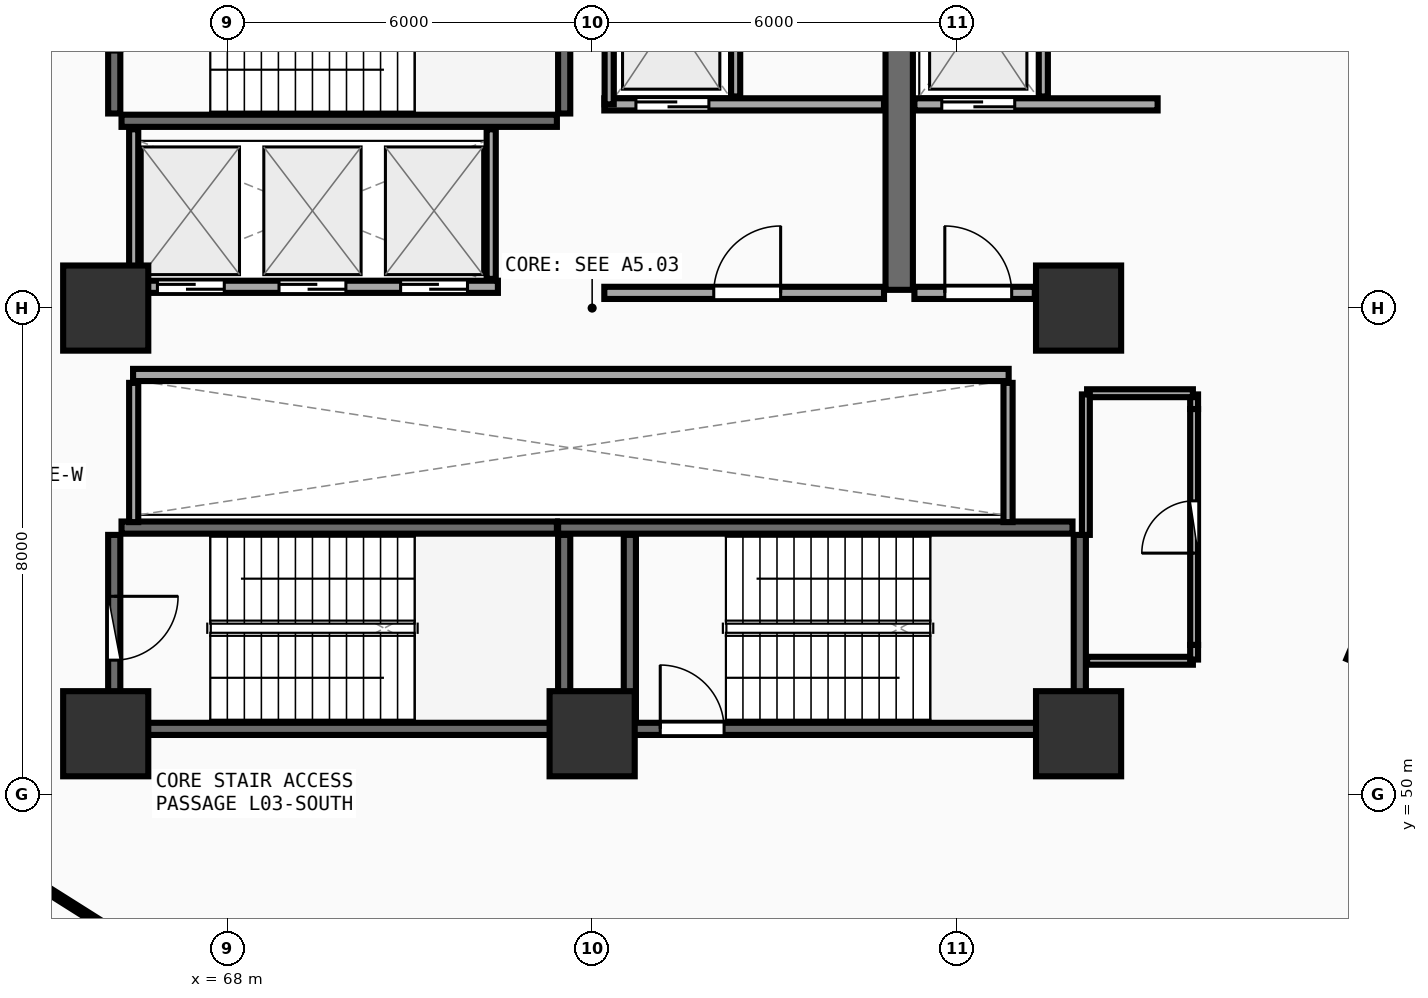
"""IFC4 building model, lengths in metres.
Left out: names, types, materials, properties, quantities, classifications, styles, units other than length and angle.
Written with IfcOpenShell. Run it as: python <this file> out.ifc"""

import sys

from ifc_helpers import new_model, si_unit, direction, frame, frame_2d, origin, origin_2d, place, context, subcontext, project, spatial, rectangle, extrude, element, fill, save


model = new_model("IFC4")
c1 = context("Model", 3, precision=1e-05, world=origin(), true_north=direction((0.0, 1.0)))
c2 = subcontext(c1, "Body", "Model", "MODEL_VIEW")
j1 = project(units=[si_unit("LENGTHUNIT", "METRE"), si_unit("PLANEANGLEUNIT", "RADIAN")], contexts=[c1])
p1 = place(None, origin())
s1 = spatial("IfcSite", under=j1, at=p1, CompositionType="ELEMENT")
p2 = place(p1, origin())
s2 = spatial("IfcBuilding", under=s1, at=p2, CompositionType="ELEMENT")
p3 = place(p2, frame((0.0, 0.0, 13.5)))
s3 = spatial("IfcBuildingStorey", under=s2, at=p3, CompositionType="ELEMENT", Elevation=13.5)
for number, where, z_axis, x_axis in (
    (1, (66.0, 51.0, 0.0), (0.0, 0.0, 1.0), (1.0, 0.0, 0.0)),
    (2, (74.0, 51.0, 0.0), (0.0, 0.0, 1.0), (1.0, 0.0, 0.0)),
    (3, (82.0, 51.0, 0.0), (0.0, 0.0, 1.0), (1.0, 0.0, 0.0)),
    (4, (82.0, 58.0, 0.0), (0.0, 0.0, 1.0), (1.0, 0.0, 0.0)),
    (5, (66.0, 58.0, 0.0), (0.0, 0.0, 1.0), (1.0, 0.0, 0.0)),
):
    element("IfcColumn", number, at=place(p3, frame(where, z_axis=z_axis, x_axis=x_axis)), inside=s3, PredefinedType="PILASTER", context=c2, shape_type="SweptSolid", body=[
        extrude(rectangle(XDim=1.4, YDim=1.4, at=origin_2d()), origin(), (0.0, 0.0, 1.0), 4.5),
    ])
p4 = place(p3, frame((66.26, 61.08, 0.0), z_axis=(0.0, 0.0, 1.0), x_axis=(1.0, 0.0, 0.0)))
e6 = element("IfcWall", 6, at=p4, inside=s3, PredefinedType="SHEAR", context=c2, shape_type="SweptSolid", body=[
    extrude(rectangle(XDim=7.16, YDim=0.2, at=frame_2d((3.58, 0.0))), origin(), (0.0, 0.0, 1.0), 4.1),
])
p5 = place(p3, frame((73.54, 61.2, 0.0), z_axis=(0.0, 0.0, 1.0), x_axis=(0.0, 1.0, 0.0)))
e7 = element("IfcWall", 7, at=p5, inside=s3, PredefinedType="SHEAR", context=c2, shape_type="SweptSolid", body=[
    extrude(rectangle(XDim=3.07, YDim=0.2, at=frame_2d((1.535, 0.0))), origin(), (0.0, 0.0, 1.0), 4.1),
])
p6 = place(p3, frame((66.14, 64.27, 0.0), z_axis=(0.0, 0.0, 1.0), x_axis=(0.0, -1.0, 0.0)))
e8 = element("IfcWall", 8, at=p6, inside=s3, PredefinedType="SHEAR", context=c2, shape_type="SweptSolid", body=[
    extrude(rectangle(XDim=3.07, YDim=0.2, at=frame_2d((1.535, 0.0))), origin(), (0.0, 0.0, 1.0), 4.1),
])
p7 = place(p6, frame((1.01, 0.0, 0.0)))
e9 = element("IfcOpeningElement", 9, at=p7, cuts=e8, PredefinedType="OPENING", context=c2, shape_type="SweptSolid", body=[
    extrude(rectangle(XDim=1.05, YDim=2.1, at=frame_2d((0.525, 1.05))), frame((0.0, 0.11, 0.0), z_axis=(0.0, -1.0, 0.0), x_axis=(1.0, 0.0, 0.0)), (0.0, 0.0, 1.0), 0.22),
])
p8 = place(p3, frame((74.0, 51.08, 0.0), z_axis=(0.0, 0.0, 1.0), x_axis=(1.0, 0.0, 0.0)))
e10 = element("IfcWall", 10, at=p8, inside=s3, PredefinedType="SHEAR", context=c2, shape_type="SweptSolid", body=[
    extrude(rectangle(XDim=7.9, YDim=0.2, at=frame_2d((3.95, 0.0))), origin(), (0.0, 0.0, 1.0), 4.1),
])
p9 = place(p8, frame((1.12, 0.0, 0.0)))
e11 = element("IfcOpeningElement", 11, at=p9, cuts=e10, PredefinedType="OPENING", context=c2, shape_type="SweptSolid", body=[
    extrude(rectangle(XDim=1.05, YDim=2.1, at=frame_2d((0.525, 1.05))), frame((0.0, 0.11, 0.0), z_axis=(0.0, -1.0, 0.0), x_axis=(1.0, 0.0, 0.0)), (0.0, 0.0, 1.0), 0.22),
])
p10 = place(p3, frame((82.02, 51.2, 0.0), z_axis=(0.0, 0.0, 1.0), x_axis=(0.0, 1.0, 0.0)))
e12 = element("IfcWall", 12, at=p10, inside=s3, PredefinedType="SHEAR", context=c2, shape_type="SweptSolid", body=[
    extrude(rectangle(XDim=3.07, YDim=0.2, at=frame_2d((1.535, 0.0))), origin(), (0.0, 0.0, 1.0), 4.1),
])
p11 = place(p3, frame((81.9, 54.39, 0.0), z_axis=(0.0, 0.0, 1.0), x_axis=(-1.0, 0.0, 0.0)))
e13 = element("IfcWall", 13, at=p11, inside=s3, PredefinedType="SHEAR", context=c2, shape_type="SweptSolid", body=[
    extrude(rectangle(XDim=8.46, YDim=0.2, at=frame_2d((4.23, 0.0))), origin(), (0.0, 0.0, 1.0), 4.1),
])
p12 = place(p3, frame((74.62, 54.27, 0.0), z_axis=(0.0, 0.0, 1.0), x_axis=(0.0, -1.0, 0.0)))
e14 = element("IfcWall", 14, at=p12, inside=s3, PredefinedType="SHEAR", context=c2, shape_type="SweptSolid", body=[
    extrude(rectangle(XDim=3.07, YDim=0.2, at=frame_2d((1.535, 0.0))), origin(), (0.0, 0.0, 1.0), 4.1),
])
p13 = place(p3, frame((66.26, 51.08, 0.0), z_axis=(0.0, 0.0, 1.0), x_axis=(1.0, 0.0, 0.0)))
e15 = element("IfcWall", 15, at=p13, inside=s3, PredefinedType="SHEAR", context=c2, shape_type="SweptSolid", body=[
    extrude(rectangle(XDim=7.16, YDim=0.2, at=frame_2d((3.58, 0.0))), origin(), (0.0, 0.0, 1.0), 4.1),
])
p14 = place(p3, frame((73.54, 51.2, 0.0), z_axis=(0.0, 0.0, 1.0), x_axis=(0.0, 1.0, 0.0)))
e16 = element("IfcWall", 16, at=p14, inside=s3, PredefinedType="SHEAR", context=c2, shape_type="SweptSolid", body=[
    extrude(rectangle(XDim=3.07, YDim=0.2, at=frame_2d((1.535, 0.0))), origin(), (0.0, 0.0, 1.0), 4.1),
])
p15 = place(p3, frame((73.42, 54.39, 0.0), z_axis=(0.0, 0.0, 1.0), x_axis=(-1.0, 0.0, 0.0)))
e17 = element("IfcWall", 17, at=p15, inside=s3, PredefinedType="SHEAR", context=c2, shape_type="SweptSolid", body=[
    extrude(rectangle(XDim=7.16, YDim=0.2, at=frame_2d((3.58, 0.0))), origin(), (0.0, 0.0, 1.0), 4.1),
])
p16 = place(p3, frame((66.14, 54.27, 0.0), z_axis=(0.0, 0.0, 1.0), x_axis=(0.0, -1.0, 0.0)))
e18 = element("IfcWall", 18, at=p16, inside=s3, PredefinedType="SHEAR", context=c2, shape_type="SweptSolid", body=[
    extrude(rectangle(XDim=3.07, YDim=0.2, at=frame_2d((1.535, 0.0))), origin(), (0.0, 0.0, 1.0), 4.1),
])
p17 = place(p16, frame((1.01, 0.0, 0.0)))
e19 = element("IfcOpeningElement", 19, at=p17, cuts=e18, PredefinedType="OPENING", context=c2, shape_type="SweptSolid", body=[
    extrude(rectangle(XDim=1.05, YDim=2.1, at=frame_2d((0.525, 1.05))), frame((0.0, 0.11, 0.0), z_axis=(0.0, -1.0, 0.0), x_axis=(1.0, 0.0, 0.0)), (0.0, 0.0, 1.0), 0.22),
])
p18 = place(p3, frame((79.05, 58.3, 0.0), z_axis=(0.0, 0.0, 1.0), x_axis=(0.0, 1.0, 0.0)))
e20 = element("IfcWall", 20, at=p18, inside=s3, PredefinedType="SHEAR", context=c2, shape_type="SweptSolid", body=[
    extrude(rectangle(XDim=6.3, YDim=0.45, at=frame_2d((3.15, 0.0))), origin(), (0.0, 0.0, 1.0), 4.1),
])
p19 = place(p3, frame((74.2, 61.35, 0.0), z_axis=(0.0, 0.0, 1.0), x_axis=(1.0, 0.0, 0.0)))
e21 = element("IfcWall", 21, at=p19, inside=s3, PredefinedType="SOLIDWALL", context=c2, shape_type="SweptSolid", body=[
    extrude(rectangle(XDim=4.6, YDim=0.2, at=frame_2d((2.3, 0.0))), origin(), (0.0, 0.0, 1.0), 4.09),
])
p20 = place(p19, frame((0.52, 0.0, 0.0)))
e22 = element("IfcOpeningElement", 22, at=p20, cuts=e21, PredefinedType="OPENING", context=c2, shape_type="SweptSolid", body=[
    extrude(rectangle(XDim=1.2, YDim=2.15, at=frame_2d((0.6, 1.075))), frame((0.0, 0.11, 0.0), z_axis=(0.0, -1.0, 0.0), x_axis=(1.0, 0.0, 0.0)), (0.0, 0.0, 1.0), 0.22),
])
p21 = place(p3, frame((74.28, 61.35, 0.0), z_axis=(0.0, 0.0, 1.0), x_axis=(0.0, 1.0, 0.0)))
e23 = element("IfcWall", 23, at=p21, inside=s3, PredefinedType="PARTITIONING", context=c2, shape_type="SweptSolid", body=[
    extrude(rectangle(XDim=2.97, YDim=0.15, at=frame_2d((1.485, 0.0))), origin(), (0.0, 0.0, 1.0), 4.09),
])
p22 = place(p3, frame((76.36, 61.48, 0.0), z_axis=(0.0, 0.0, 1.0), x_axis=(0.0, 1.0, 0.0)))
e24 = element("IfcWall", 24, at=p22, inside=s3, PredefinedType="PARTITIONING", context=c2, shape_type="SweptSolid", body=[
    extrude(rectangle(XDim=2.84, YDim=0.15, at=frame_2d((1.42, 0.0))), origin(), (0.0, 0.0, 1.0), 4.09),
])
p23 = place(p3, frame((79.3, 61.35, 0.0), z_axis=(0.0, 0.0, 1.0), x_axis=(1.0, 0.0, 0.0)))
e25 = element("IfcWall", 25, at=p23, inside=s3, PredefinedType="SOLIDWALL", context=c2, shape_type="SweptSolid", body=[
    extrude(rectangle(XDim=4.0, YDim=0.2, at=frame_2d((2.0, 0.0))), origin(), (0.0, 0.0, 1.0), 3.385),
])
p24 = place(p23, frame((0.45, 0.0, 0.0)))
e26 = element("IfcOpeningElement", 26, at=p24, cuts=e25, PredefinedType="OPENING", context=c2, shape_type="SweptSolid", body=[
    extrude(rectangle(XDim=1.2, YDim=2.15, at=frame_2d((0.6, 1.075))), frame((0.0, 0.11, 0.0), z_axis=(0.0, -1.0, 0.0), x_axis=(1.0, 0.0, 0.0)), (0.0, 0.0, 1.0), 0.22),
])
p25 = place(p3, frame((81.42, 61.48, 0.0), z_axis=(0.0, 0.0, 1.0), x_axis=(0.0, 1.0, 0.0)))
e27 = element("IfcWall", 27, at=p25, inside=s3, PredefinedType="PARTITIONING", context=c2, shape_type="SweptSolid", body=[
    extrude(rectangle(XDim=2.84, YDim=0.15, at=frame_2d((1.42, 0.0))), origin(), (0.0, 0.0, 1.0), 4.09),
])
p26 = place(p3, frame((74.2, 58.25, 0.0), z_axis=(0.0, 0.0, 1.0), x_axis=(1.0, 0.0, 0.0)))
e28 = element("IfcWall", 28, at=p26, inside=s3, PredefinedType="SOLIDWALL", context=c2, shape_type="SweptSolid", body=[
    extrude(rectangle(XDim=4.6, YDim=0.2, at=frame_2d((2.3, 0.0))), origin(), (0.0, 0.0, 1.0), 4.09),
])
p27 = place(p26, frame((1.8, 0.0, 0.0)))
e29 = element("IfcOpeningElement", 29, at=p27, cuts=e28, PredefinedType="OPENING", context=c2, shape_type="SweptSolid", body=[
    extrude(rectangle(XDim=1.1, YDim=2.1, at=frame_2d((0.55, 1.05))), frame((0.0, 0.11, 0.0), z_axis=(0.0, -1.0, 0.0), x_axis=(1.0, 0.0, 0.0)), (0.0, 0.0, 1.0), 0.22),
])
p28 = place(p3, frame((79.3, 58.25, 0.0), z_axis=(0.0, 0.0, 1.0), x_axis=(1.0, 0.0, 0.0)))
e30 = element("IfcWall", 30, at=p28, inside=s3, PredefinedType="SOLIDWALL", context=c2, shape_type="SweptSolid", body=[
    extrude(rectangle(XDim=1.98, YDim=0.2, at=frame_2d((0.99, 0.0))), origin(), (0.0, 0.0, 1.0), 4.09),
])
p29 = place(p28, frame((0.5, 0.0, 0.0)))
e31 = element("IfcOpeningElement", 31, at=p29, cuts=e30, PredefinedType="OPENING", context=c2, shape_type="SweptSolid", body=[
    extrude(rectangle(XDim=1.1, YDim=2.1, at=frame_2d((0.55, 1.05))), frame((0.0, 0.11, 0.0), z_axis=(0.0, -1.0, 0.0), x_axis=(1.0, 0.0, 0.0)), (0.0, 0.0, 1.0), 0.22),
])
p30 = place(p3, frame((66.45, 58.35, 0.0), z_axis=(0.0, 0.0, 1.0), x_axis=(1.0, 0.0, 0.0)))
e32 = element("IfcWall", 32, at=p30, inside=s3, PredefinedType="SOLIDWALL", context=c2, shape_type="SweptSolid", body=[
    extrude(rectangle(XDim=6.0, YDim=0.2, at=frame_2d((3.0, 0.0))), origin(), (0.0, 0.0, 1.0), 4.09),
])
p31 = place(p30, frame((0.4, 0.0, 0.0)))
e33 = element("IfcOpeningElement", 33, at=p31, cuts=e32, PredefinedType="OPENING", context=c2, shape_type="SweptSolid", body=[
    extrude(rectangle(XDim=1.1, YDim=2.1, at=frame_2d((0.55, 1.05))), frame((0.0, 0.11, 0.0), z_axis=(0.0, -1.0, 0.0), x_axis=(1.0, 0.0, 0.0)), (0.0, 0.0, 1.0), 0.22),
])
p32 = place(p30, frame((2.4, 0.0, 0.0)))
e34 = element("IfcOpeningElement", 34, at=p32, cuts=e32, PredefinedType="OPENING", context=c2, shape_type="SweptSolid", body=[
    extrude(rectangle(XDim=1.1, YDim=2.1, at=frame_2d((0.55, 1.05))), frame((0.0, 0.11, 0.0), z_axis=(0.0, -1.0, 0.0), x_axis=(1.0, 0.0, 0.0)), (0.0, 0.0, 1.0), 0.22),
])
p33 = place(p30, frame((4.4, 0.0, 0.0)))
e35 = element("IfcOpeningElement", 35, at=p33, cuts=e32, PredefinedType="OPENING", context=c2, shape_type="SweptSolid", body=[
    extrude(rectangle(XDim=1.1, YDim=2.1, at=frame_2d((0.55, 1.05))), frame((0.0, 0.11, 0.0), z_axis=(0.0, -1.0, 0.0), x_axis=(1.0, 0.0, 0.0)), (0.0, 0.0, 1.0), 0.22),
])
for number, where, z_axis, x_axis in (
    (36, (66.46, 58.48, 0.0), (0.0, 0.0, 1.0), (0.0, 1.0, 0.0)),
    (37, (72.34, 58.48, 0.0), (0.0, 0.0, 1.0), (0.0, 1.0, 0.0)),
):
    element("IfcWall", number, at=place(p3, frame(where, z_axis=z_axis, x_axis=x_axis)), inside=s3, PredefinedType="PARTITIONING", context=c2, shape_type="SweptSolid", body=[
        extrude(rectangle(XDim=2.46, YDim=0.15, at=frame_2d((1.23, 0.0))), origin(), (0.0, 0.0, 1.0), 4.09),
    ])
p34 = place(p3, frame((66.45, 56.9, 0.0), z_axis=(0.0, 0.0, 1.0), x_axis=(1.0, 0.0, 0.0)))
e38 = element("IfcWall", 38, at=p34, inside=s3, PredefinedType="SOLIDWALL", context=c2, shape_type="SweptSolid", body=[
    extrude(rectangle(XDim=14.4, YDim=0.2, at=frame_2d((7.2, 0.0))), origin(), (0.0, 0.0, 1.0), 4.09),
])
for number, where, z_axis, x_axis in (
    (39, (66.46, 54.48, 0.0), (0.0, 0.0, 1.0), (0.0, 1.0, 0.0)),
    (40, (80.84, 54.48, 0.0), (0.0, 0.0, 1.0), (0.0, 1.0, 0.0)),
):
    element("IfcWall", number, at=place(p3, frame(where, z_axis=z_axis, x_axis=x_axis)), inside=s3, PredefinedType="PARTITIONING", context=c2, shape_type="SweptSolid", body=[
        extrude(rectangle(XDim=2.29, YDim=0.15, at=frame_2d((1.145, 0.0))), origin(), (0.0, 0.0, 1.0), 4.09),
    ])
p35 = place(p3, frame((83.9, 52.46, 0.0), z_axis=(0.0, 0.0, 1.0), x_axis=(0.0, 1.0, 0.0)))
e41 = element("IfcWall", 41, at=p35, inside=s3, PredefinedType="PLUMBINGWALL", context=c2, shape_type="SweptSolid", body=[
    extrude(rectangle(XDim=3.88, YDim=0.13, at=frame_2d((1.94, 0.0))), origin(), (0.0, 0.0, 1.0), 4.09),
])
p36 = place(p35, frame((1.51, 0.0, 0.0)))
e42 = element("IfcOpeningElement", 42, at=p36, cuts=e41, PredefinedType="OPENING", context=c2, shape_type="SweptSolid", body=[
    extrude(rectangle(XDim=0.86, YDim=2.05, at=frame_2d((0.43, 1.025))), frame((0.0, 0.075, 0.0), z_axis=(0.0, -1.0, 0.0), x_axis=(1.0, 0.0, 0.0)), (0.0, 0.0, 1.0), 0.15),
])
p37 = place(p3, frame((82.14, 52.2, 0.0), z_axis=(0.0, 0.0, 1.0), x_axis=(1.0, 0.0, 0.0)))
e43 = element("IfcWall", 43, at=p37, inside=s3, PredefinedType="PLUMBINGWALL", context=c2, shape_type="SweptSolid", body=[
    extrude(rectangle(XDim=1.74, YDim=0.13, at=frame_2d((0.87, 0.0))), origin(), (0.0, 0.0, 1.0), 3.385),
])
for number, where, z_axis, x_axis in (
    (44, (83.9, 52.22, 0.0), (0.0, 0.0, 1.0), (0.0, 1.0, 0.0)),
    (45, (83.9, 56.34, 0.0), (0.0, 0.0, 1.0), (0.0, 1.0, 0.0)),
):
    element("IfcWall", number, at=place(p3, frame(where, z_axis=z_axis, x_axis=x_axis)), inside=s3, PredefinedType="PLUMBINGWALL", context=c2, shape_type="SweptSolid", body=[
        extrude(rectangle(XDim=0.24, YDim=0.13, at=frame_2d((0.12, 0.0))), origin(), (0.0, 0.0, 1.0), 4.09),
    ])
p38 = place(p3, frame((83.88, 56.6, 0.0), z_axis=(0.0, 0.0, 1.0), x_axis=(-1.0, 0.0, 0.0)))
e46 = element("IfcWall", 46, at=p38, inside=s3, PredefinedType="PLUMBINGWALL", context=c2, shape_type="SweptSolid", body=[
    extrude(rectangle(XDim=1.74, YDim=0.13, at=frame_2d((0.87, 0.0))), origin(), (0.0, 0.0, 1.0), 3.385),
])
p39 = place(p3, frame((82.12, 56.58, 0.0), z_axis=(0.0, 0.0, 1.0), x_axis=(0.0, -1.0, 0.0)))
e47 = element("IfcWall", 47, at=p39, inside=s3, PredefinedType="PLUMBINGWALL", context=c2, shape_type="SweptSolid", body=[
    extrude(rectangle(XDim=2.31, YDim=0.13, at=frame_2d((1.155, 0.0))), origin(), (0.0, 0.0, 1.0), 3.385),
])
p40 = place(p3, frame((64.295, 48.901, 0.0), z_axis=(0.0, 0.0, 1.0), x_axis=(0.845938242176, -0.533280873859, 0.0)))
e48 = element("IfcWall", 48, at=p40, inside=s3, PredefinedType="PARTITIONING", context=c2, shape_type="SweptSolid", body=[
    extrude(rectangle(XDim=4.167, YDim=0.1, at=frame_2d((2.084, 0.0))), origin(), (0.0, 0.0, 1.0), 3.485),
])
p41 = place(p3, frame((86.451, 52.21, 0.0), z_axis=(0.0, 0.0, 1.0), x_axis=(0.388068176064, 0.921630669372, 0.0)))
e49 = element("IfcWall", 49, at=p41, inside=s3, PredefinedType="PARTITIONING", context=c2, shape_type="SweptSolid", body=[
    extrude(rectangle(XDim=2.93, YDim=0.1, at=frame_2d((1.465, 0.0))), origin(), (0.0, 0.0, 1.0), 4.09),
])
p42 = place(p9, origin())
e50 = element("IfcDoor", 50, at=p42, inside=s3, OperationType="SINGLE_SWING_LEFT", PredefinedType="DOOR", context=c2, shape_type="SweptSolid", body=[
    extrude(rectangle(XDim=1.05, YDim=2.1, at=frame_2d((0.525, 1.05))), frame((0.0, 0.025, 0.0), z_axis=(0.0, -1.0, 0.0), x_axis=(1.0, 0.0, 0.0)), (0.0, 0.0, 1.0), 0.05),
])
fill(e11, e50)
p43 = place(p17, origin())
e51 = element("IfcDoor", 51, at=p43, inside=s3, OperationType="SINGLE_SWING_LEFT", PredefinedType="DOOR", context=c2, shape_type="SweptSolid", body=[
    extrude(rectangle(XDim=1.05, YDim=2.1, at=frame_2d((0.525, 1.05))), frame((0.0, 0.025, 0.0), z_axis=(0.0, -1.0, 0.0), x_axis=(1.0, 0.0, 0.0)), (0.0, 0.0, 1.0), 0.05),
])
fill(e19, e51)
p44 = place(p20, origin())
e52 = element("IfcDoor", 52, at=p44, inside=s3, OperationType="DOUBLE_DOOR_SLIDING", PredefinedType="DOOR", context=c2, shape_type="SweptSolid", body=[
    extrude(rectangle(XDim=1.2, YDim=2.15, at=frame_2d((0.6, 1.075))), frame((0.0, 0.025, 0.0), z_axis=(0.0, -1.0, 0.0), x_axis=(1.0, 0.0, 0.0)), (0.0, 0.0, 1.0), 0.05),
])
fill(e22, e52)
p45 = place(p24, origin())
e53 = element("IfcDoor", 53, at=p45, inside=s3, OperationType="DOUBLE_DOOR_SLIDING", PredefinedType="DOOR", context=c2, shape_type="SweptSolid", body=[
    extrude(rectangle(XDim=1.2, YDim=2.15, at=frame_2d((0.6, 1.075))), frame((0.0, 0.025, 0.0), z_axis=(0.0, -1.0, 0.0), x_axis=(1.0, 0.0, 0.0)), (0.0, 0.0, 1.0), 0.05),
])
fill(e26, e53)
p46 = place(p27, frame((1.1, 0.0, 0.0), z_axis=(0.0, 0.0, 1.0), x_axis=(-1.0, 0.0, 0.0)))
e54 = element("IfcDoor", 54, at=p46, inside=s3, OperationType="SINGLE_SWING_LEFT", PredefinedType="DOOR", context=c2, shape_type="SweptSolid", body=[
    extrude(rectangle(XDim=1.1, YDim=2.1, at=frame_2d((0.55, 1.05))), frame((0.0, 0.025, 0.0), z_axis=(0.0, -1.0, 0.0), x_axis=(1.0, 0.0, 0.0)), (0.0, 0.0, 1.0), 0.05),
])
fill(e29, e54)
p47 = place(p29, frame((1.1, 0.0, 0.0), z_axis=(0.0, 0.0, 1.0), x_axis=(-1.0, 0.0, 0.0)))
e55 = element("IfcDoor", 55, at=p47, inside=s3, OperationType="SINGLE_SWING_RIGHT", PredefinedType="DOOR", context=c2, shape_type="SweptSolid", body=[
    extrude(rectangle(XDim=1.1, YDim=2.1, at=frame_2d((0.55, 1.05))), frame((0.0, 0.025, 0.0), z_axis=(0.0, -1.0, 0.0), x_axis=(1.0, 0.0, 0.0)), (0.0, 0.0, 1.0), 0.05),
])
fill(e31, e55)
p48 = place(p31, origin())
e56 = element("IfcDoor", 56, at=p48, inside=s3, OperationType="DOUBLE_DOOR_SLIDING", PredefinedType="DOOR", context=c2, shape_type="SweptSolid", body=[
    extrude(rectangle(XDim=1.1, YDim=2.1, at=frame_2d((0.55, 1.05))), frame((0.0, 0.025, 0.0), z_axis=(0.0, -1.0, 0.0), x_axis=(1.0, 0.0, 0.0)), (0.0, 0.0, 1.0), 0.05),
])
fill(e33, e56)
p49 = place(p32, origin())
e57 = element("IfcDoor", 57, at=p49, inside=s3, OperationType="DOUBLE_DOOR_SLIDING", PredefinedType="DOOR", context=c2, shape_type="SweptSolid", body=[
    extrude(rectangle(XDim=1.1, YDim=2.1, at=frame_2d((0.55, 1.05))), frame((0.0, 0.025, 0.0), z_axis=(0.0, -1.0, 0.0), x_axis=(1.0, 0.0, 0.0)), (0.0, 0.0, 1.0), 0.05),
])
fill(e34, e57)
p50 = place(p33, origin())
e58 = element("IfcDoor", 58, at=p50, inside=s3, OperationType="DOUBLE_DOOR_SLIDING", PredefinedType="DOOR", context=c2, shape_type="SweptSolid", body=[
    extrude(rectangle(XDim=1.1, YDim=2.1, at=frame_2d((0.55, 1.05))), frame((0.0, 0.025, 0.0), z_axis=(0.0, -1.0, 0.0), x_axis=(1.0, 0.0, 0.0)), (0.0, 0.0, 1.0), 0.05),
])
fill(e35, e58)
p51 = place(p36, origin())
e59 = element("IfcDoor", 59, at=p51, inside=s3, OperationType="SINGLE_SWING_LEFT", PredefinedType="DOOR", context=c2, shape_type="SweptSolid", body=[
    extrude(rectangle(XDim=0.86, YDim=2.05, at=frame_2d((0.43, 1.025))), frame((0.0, 0.025, 0.0), z_axis=(0.0, -1.0, 0.0), x_axis=(1.0, 0.0, 0.0)), (0.0, 0.0, 1.0), 0.05),
])
fill(e42, e59)
save(model, sys.argv[1])
